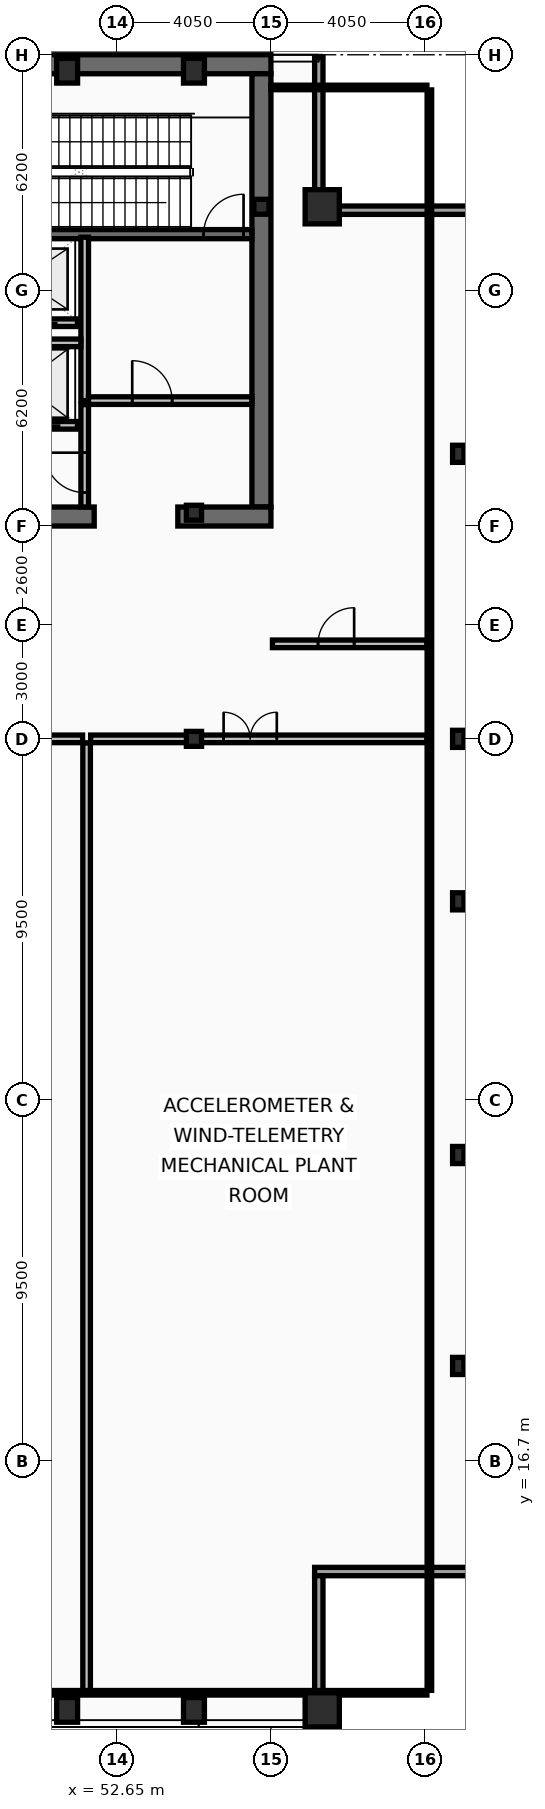
"""IFC4 building model, lengths in metres.
Left out: names, types, materials, properties, quantities, classifications, styles, units other than length and angle.
Written with IfcOpenShell. Run it as: python <this file> out.ifc"""

import sys

from ifc_helpers import new_model, si_unit, direction, frame, frame_2d, origin, origin_2d, place, context, subcontext, project, spatial, rectangle, hollow_rectangle, i_section, extrude, element, fill, save


model = new_model("IFC4")
c1 = context("Model", 3, precision=1e-05, world=origin(), true_north=direction((0.0, 1.0)))
c2 = subcontext(c1, "Body", "Model", "MODEL_VIEW")
j1 = project(units=[si_unit("LENGTHUNIT", "METRE"), si_unit("PLANEANGLEUNIT", "RADIAN")], contexts=[c1])
p1 = place(None, origin())
s1 = spatial("IfcSite", under=j1, at=p1, CompositionType="ELEMENT")
p2 = place(p1, origin())
s2 = spatial("IfcBuilding", under=s1, at=p2, CompositionType="ELEMENT")
p3 = place(p2, frame((0.0, 0.0, 350.6)))
s3 = spatial("IfcBuildingStorey", under=s2, at=p3, CompositionType="ELEMENT", Elevation=350.6)
p4 = place(p3, frame((16.2, 53.45, 0.0), z_axis=(0.0, 0.0, 1.0), x_axis=(1.0, 0.0, 0.0)))
e1 = element("IfcWall", 1, at=p4, inside=s3, PredefinedType="SHEAR", context=c2, shape_type="SweptSolid", body=[
    extrude(rectangle(XDim=40.5, YDim=0.5, at=frame_2d((20.25, 0.0))), origin(), (0.0, 0.0, 1.0), 5.4),
])
p5 = place(p3, frame((56.45, 53.2, 0.0), z_axis=(0.0, 0.0, 1.0), x_axis=(0.0, -1.0, 0.0)))
e2 = element("IfcWall", 2, at=p5, inside=s3, PredefinedType="SHEAR", context=c2, shape_type="SweptSolid", body=[
    extrude(rectangle(XDim=11.4, YDim=0.5, at=frame_2d((5.7, 0.0))), origin(), (0.0, 0.0, 1.0), 5.4),
])
p6 = place(p3, frame((52.05, 41.55, 0.0), z_axis=(0.0, 0.0, 1.0), x_axis=(-1.0, 0.0, 0.0)))
e3 = element("IfcWall", 3, at=p6, inside=s3, PredefinedType="SHEAR", context=c2, shape_type="SweptSolid", body=[
    extrude(rectangle(XDim=11.3, YDim=0.5, at=frame_2d((5.65, 0.0))), origin(), (0.0, 0.0, 1.0), 5.4),
])
p7 = place(p3, frame((56.7, 41.55, 0.0), z_axis=(0.0, 0.0, 1.0), x_axis=(-1.0, 0.0, 0.0)))
e4 = element("IfcWall", 4, at=p7, inside=s3, PredefinedType="SHEAR", context=c2, shape_type="SweptSolid", body=[
    extrude(rectangle(XDim=2.45, YDim=0.5, at=frame_2d((1.225, 0.0))), origin(), (0.0, 0.0, 1.0), 5.4),
])
p8 = place(p3, frame((48.63, 48.98, 0.0), z_axis=(0.0, 0.0, 1.0), x_axis=(1.0, 0.0, 0.0)))
e5 = element("IfcWall", 5, at=p8, inside=s3, PredefinedType="SHEAR", context=c2, shape_type="SweptSolid", body=[
    extrude(rectangle(XDim=7.57, YDim=0.24, at=frame_2d((3.785, 0.0))), origin(), (0.0, 0.0, 1.0), 5.4),
])
p9 = place(p8, frame((6.3, 0.0, 0.0)))
e6 = element("IfcOpeningElement", 6, at=p9, cuts=e5, PredefinedType="OPENING", context=c2, shape_type="SweptSolid", body=[
    extrude(rectangle(XDim=1.05, YDim=2.15, at=frame_2d((0.525, 1.075))), frame((0.0, 0.13, 0.0), z_axis=(0.0, -1.0, 0.0), x_axis=(1.0, 0.0, 0.0)), (0.0, 0.0, 1.0), 0.26),
])
for number, where, z_axis, x_axis in (
    (7, (58.05, 10.15, 0.0), (0.0, 0.0, 1.0), (1.0, 0.0, 0.0)),
    (8, (58.05, 49.7, 0.0), (0.0, 0.0, 1.0), (1.0, 0.0, 0.0)),
):
    element("IfcColumn", number, at=place(p3, frame(where, z_axis=z_axis, x_axis=x_axis)), inside=s3, PredefinedType="COLUMN", context=c2, shape_type="SweptSolid", body=[
        extrude(hollow_rectangle(XDim=0.9, YDim=0.9, WallThickness=0.05, at=origin_2d()), origin(), (0.0, 0.0, 1.0), 5.6),
    ])
for number, where, z_axis, x_axis in (
    (9, (51.337, 10.15, 0.0), (0.0, 0.0, 1.0), (1.0, 0.0, 0.0)),
    (10, (54.675, 10.15, 0.0), (0.0, 0.0, 1.0), (1.0, 0.0, 0.0)),
    (11, (51.337, 53.28, 0.0), (0.0, 0.0, 1.0), (1.0, 0.0, 0.0)),
    (12, (54.675, 53.28, 0.0), (0.0, 0.0, 1.0), (1.0, 0.0, 0.0)),
):
    element("IfcColumn", number, at=place(p3, frame(where, z_axis=z_axis, x_axis=x_axis)), inside=s3, PredefinedType="COLUMN", context=c2, shape_type="SweptSolid", body=[
        extrude(hollow_rectangle(XDim=0.55, YDim=0.65, WallThickness=0.04, at=origin_2d()), origin(), (0.0, 0.0, 1.0), 5.6),
    ])
for number, where, z_axis, x_axis in (
    (13, (61.63, 19.2, 0.0), (0.0, 0.0, 1.0), (1.0, 0.0, 0.0)),
    (14, (61.63, 24.75, 0.0), (0.0, 0.0, 1.0), (1.0, 0.0, 0.0)),
    (15, (61.63, 31.425, 0.0), (0.0, 0.0, 1.0), (1.0, 0.0, 0.0)),
    (16, (61.63, 35.7, 0.0), (0.0, 0.0, 1.0), (1.0, 0.0, 0.0)),
    (17, (61.63, 43.2, 0.0), (0.0, 0.0, 1.0), (1.0, 0.0, 0.0)),
):
    element("IfcColumn", number, at=place(p3, frame(where, z_axis=z_axis, x_axis=x_axis)), inside=s3, PredefinedType="COLUMN", context=c2, shape_type="SweptSolid", body=[
        extrude(i_section(OverallWidth=0.3, OverallDepth=0.45, WebThickness=0.014, FlangeThickness=0.026, at=origin_2d()), origin(), (0.0, 0.0, 1.0), 5.6),
    ])
for number, where, z_axis, x_axis in (
    (18, (56.45, 49.7, 0.0), (0.0, 0.0, 1.0), (1.0, 0.0, 0.0)),
    (19, (54.675, 35.7, 0.0), (0.0, 0.0, 1.0), (1.0, 0.0, 0.0)),
    (20, (54.675, 41.65, 0.0), (0.0, 0.0, 1.0), (1.0, 0.0, 0.0)),
):
    element("IfcColumn", number, at=place(p3, frame(where, z_axis=z_axis, x_axis=x_axis)), inside=s3, PredefinedType="COLUMN", context=c2, shape_type="SweptSolid", body=[
        extrude(i_section(OverallWidth=0.399, OverallDepth=0.393, WebThickness=0.023, FlangeThickness=0.037, at=origin_2d()), origin(), (0.0, 0.0, 1.0), 5.6),
    ])
p10 = place(p3, frame((57.96, 53.63, 0.0), z_axis=(0.0, 0.0, 1.0), x_axis=(0.0, -1.0, 0.0)))
e21 = element("IfcWall", 21, at=p10, inside=s3, PredefinedType="SOLIDWALL", context=c2, shape_type="SweptSolid", body=[
    extrude(rectangle(XDim=3.91, YDim=0.22, at=frame_2d((1.955, 0.0))), origin(), (0.0, 0.0, 1.0), 4.84),
])
for number, where, z_axis, x_axis in (
    (22, (57.85, 49.61, 0.0), (0.0, 0.0, 1.0), (1.0, 0.0, 0.0)),
    (23, (61.98, 13.79, 0.0), (0.0, 0.0, 1.0), (-1.0, 0.0, 0.0)),
):
    element("IfcWall", number, at=place(p3, frame(where, z_axis=z_axis, x_axis=x_axis)), inside=s3, PredefinedType="SOLIDWALL", context=c2, shape_type="SweptSolid", body=[
        extrude(rectangle(XDim=4.13, YDim=0.22, at=frame_2d((2.065, 0.0))), origin(), (0.0, 0.0, 1.0), 4.84),
    ])
p11 = place(p3, frame((57.96, 13.68, 0.0), z_axis=(0.0, 0.0, 1.0), x_axis=(0.0, -1.0, 0.0)))
e24 = element("IfcWall", 24, at=p11, inside=s3, PredefinedType="SOLIDWALL", context=c2, shape_type="SweptSolid", body=[
    extrude(rectangle(XDim=3.91, YDim=0.22, at=frame_2d((1.955, 0.0))), origin(), (0.0, 0.0, 1.0), 4.84),
])
p12 = place(p3, frame((51.61, 43.95, 0.0), z_axis=(0.0, 0.0, 1.0), x_axis=(-1.0, 0.0, 0.0)))
e25 = element("IfcWall", 25, at=p12, inside=s3, PredefinedType="PARTITIONING", context=c2, shape_type="SweptSolid", body=[
    extrude(rectangle(XDim=2.92, YDim=0.2, at=frame_2d((1.46, 0.0))), origin(), (0.0, 0.0, 1.0), 5.4),
])
p13 = place(p12, frame((0.81, 0.0, 0.0)))
e26 = element("IfcOpeningElement", 26, at=p13, cuts=e25, PredefinedType="OPENING", context=c2, shape_type="SweptSolid", body=[
    extrude(rectangle(XDim=1.3, YDim=2.18, at=frame_2d((0.65, 1.09))), frame((0.0, 0.11, 0.0), z_axis=(0.0, -1.0, 0.0), x_axis=(1.0, 0.0, 0.0)), (0.0, 0.0, 1.0), 0.22),
])
p14 = place(p3, frame((51.61, 46.65, 0.0), z_axis=(0.0, 0.0, 1.0), x_axis=(-1.0, 0.0, 0.0)))
e27 = element("IfcWall", 27, at=p14, inside=s3, PredefinedType="PARTITIONING", context=c2, shape_type="SweptSolid", body=[
    extrude(rectangle(XDim=2.92, YDim=0.2, at=frame_2d((1.46, 0.0))), origin(), (0.0, 0.0, 1.0), 5.4),
])
p15 = place(p14, frame((0.86, 0.0, 0.0)))
e28 = element("IfcOpeningElement", 28, at=p15, cuts=e27, PredefinedType="OPENING", context=c2, shape_type="SweptSolid", body=[
    extrude(rectangle(XDim=1.2, YDim=2.18, at=frame_2d((0.6, 1.09))), frame((0.0, 0.11, 0.0), z_axis=(0.0, -1.0, 0.0), x_axis=(1.0, 0.0, 0.0)), (0.0, 0.0, 1.0), 0.22),
])
p16 = place(p3, frame((51.8, 44.6, 0.0), z_axis=(0.0, 0.0, 1.0), x_axis=(0.0, 1.0, 0.0)))
e29 = element("IfcWall", 29, at=p16, inside=s3, PredefinedType="PARTITIONING", context=c2, shape_type="SweptSolid", body=[
    extrude(rectangle(XDim=4.3, YDim=0.2, at=frame_2d((2.15, 0.0))), origin(), (0.0, 0.0, 1.0), 5.4),
])
p17 = place(p3, frame((51.9, 44.6, 0.0), z_axis=(0.0, 0.0, 1.0), x_axis=(1.0, 0.0, 0.0)))
e30 = element("IfcWall", 30, at=p17, inside=s3, PredefinedType="PARTITIONING", context=c2, shape_type="SweptSolid", body=[
    extrude(rectangle(XDim=4.3, YDim=0.2, at=frame_2d((2.15, 0.0))), origin(), (0.0, 0.0, 1.0), 5.4),
])
p18 = place(p17, frame((1.15, 0.0, 0.0)))
e31 = element("IfcOpeningElement", 31, at=p18, cuts=e30, PredefinedType="OPENING", context=c2, shape_type="SweptSolid", body=[
    extrude(rectangle(XDim=1.05, YDim=2.15, at=frame_2d((0.525, 1.075))), frame((0.0, 0.11, 0.0), z_axis=(0.0, -1.0, 0.0), x_axis=(1.0, 0.0, 0.0)), (0.0, 0.0, 1.0), 0.22),
])
p19 = place(p3, frame((48.63, 46.12, 0.0), z_axis=(0.0, 0.0, 1.0), x_axis=(1.0, 0.0, 0.0)))
e32 = element("IfcWall", 32, at=p19, inside=s3, PredefinedType="PARTITIONING", context=c2, shape_type="SweptSolid", body=[
    extrude(rectangle(XDim=3.07, YDim=0.2, at=frame_2d((1.535, 0.0))), origin(), (0.0, 0.0, 1.0), 5.4),
])
p20 = place(p3, frame((51.8, 41.8, 0.0), z_axis=(0.0, 0.0, 1.0), x_axis=(0.0, 1.0, 0.0)))
e33 = element("IfcWall", 33, at=p20, inside=s3, PredefinedType="PARTITIONING", context=c2, shape_type="SweptSolid", body=[
    extrude(rectangle(XDim=2.695, YDim=0.2, at=frame_2d((1.348, 0.0))), origin(), (0.0, 0.0, 1.0), 5.4),
])
p21 = place(p20, frame((0.38, 0.0, 0.0)))
e34 = element("IfcOpeningElement", 34, at=p21, cuts=e33, PredefinedType="OPENING", context=c2, shape_type="SweptSolid", body=[
    extrude(rectangle(XDim=1.05, YDim=2.15, at=frame_2d((0.525, 1.075))), frame((0.0, 0.11, 0.0), z_axis=(0.0, -1.0, 0.0), x_axis=(1.0, 0.0, 0.0)), (0.0, 0.0, 1.0), 0.22),
])
p22 = place(p3, frame((47.555, 35.7, 0.0), z_axis=(0.0, 0.0, 1.0), x_axis=(1.0, 0.0, 0.0)))
e35 = element("IfcWall", 35, at=p22, inside=s3, PredefinedType="PARTITIONING", context=c2, shape_type="SweptSolid", body=[
    extrude(rectangle(XDim=4.19, YDim=0.2, at=frame_2d((2.095, 0.0))), origin(), (0.0, 0.0, 1.0), 4.79),
])
p23 = place(p3, frame((51.955, 35.7, 0.0), z_axis=(0.0, 0.0, 1.0), x_axis=(1.0, 0.0, 0.0)))
e36 = element("IfcWall", 36, at=p23, inside=s3, PredefinedType="PARTITIONING", context=c2, shape_type="SweptSolid", body=[
    extrude(rectangle(XDim=8.85, YDim=0.2, at=frame_2d((4.425, 0.0))), origin(), (0.0, 0.0, 1.0), 4.79),
])
p24 = place(p23, frame((3.5, 0.0, 0.0)))
e37 = element("IfcOpeningElement", 37, at=p24, cuts=e36, PredefinedType="OPENING", context=c2, shape_type="SweptSolid", body=[
    extrude(rectangle(XDim=1.4, YDim=2.15, at=frame_2d((0.7, 1.075))), frame((0.0, 0.11, 0.0), z_axis=(0.0, -1.0, 0.0), x_axis=(1.0, 0.0, 0.0)), (0.0, 0.0, 1.0), 0.22),
])
p25 = place(p3, frame((51.85, 10.565, 0.0), z_axis=(0.0, 0.0, 1.0), x_axis=(0.0, 1.0, 0.0)))
e38 = element("IfcWall", 38, at=p25, inside=s3, PredefinedType="PARTITIONING", context=c2, shape_type="SweptSolid", body=[
    extrude(rectangle(XDim=25.03, YDim=0.2, at=frame_2d((12.515, 0.0))), origin(), (0.0, 0.0, 1.0), 4.59),
])
p26 = place(p3, frame((56.74, 38.2, 0.0), z_axis=(0.0, 0.0, 1.0), x_axis=(1.0, 0.0, 0.0)))
e39 = element("IfcWall", 39, at=p26, inside=s3, PredefinedType="PARTITIONING", context=c2, shape_type="SweptSolid", body=[
    extrude(rectangle(XDim=4.065, YDim=0.2, at=frame_2d((2.032, 0.0))), origin(), (0.0, 0.0, 1.0), 5.4),
])
p27 = place(p26, frame((1.2, 0.0, 0.0)))
e40 = element("IfcOpeningElement", 40, at=p27, cuts=e39, PredefinedType="OPENING", context=c2, shape_type="SweptSolid", body=[
    extrude(rectangle(XDim=0.95, YDim=2.1, at=frame_2d((0.475, 1.05))), frame((0.0, 0.11, 0.0), z_axis=(0.0, -1.0, 0.0), x_axis=(1.0, 0.0, 0.0)), (0.0, 0.0, 1.0), 0.22),
])
p28 = place(p3, frame((60.87, 10.665, 0.0), z_axis=(0.0, 0.0, 1.0), x_axis=(0.0, 1.0, 0.0)))
e41 = element("IfcWall", 41, at=p28, inside=s3, PredefinedType="PARTITIONING", context=c2, shape_type="SweptSolid", body=[
    extrude(rectangle(XDim=42.11, YDim=0.12, at=frame_2d((21.055, 0.0))), origin(), (0.0, 0.0, 1.0), 4.79),
])
p29 = place(p3, frame((56.7, 52.84, 0.0), z_axis=(0.0, 0.0, 1.0), x_axis=(1.0, 0.0, 0.0)))
e42 = element("IfcWall", 42, at=p29, inside=s3, PredefinedType="PARTITIONING", context=c2, shape_type="SweptSolid", body=[
    extrude(rectangle(XDim=4.105, YDim=0.12, at=frame_2d((2.052, 0.0))), origin(), (0.0, 0.0, 1.0), 5.4),
])
p30 = place(p3, frame((12.095, 10.6, 0.0), z_axis=(0.0, 0.0, 1.0), x_axis=(1.0, 0.0, 0.0)))
e43 = element("IfcWall", 43, at=p30, inside=s3, PredefinedType="PARTITIONING", context=c2, shape_type="SweptSolid", body=[
    extrude(rectangle(XDim=48.71, YDim=0.12, at=frame_2d((24.355, 0.0))), origin(), (0.0, 0.0, 1.0), 4.79),
])
p31 = place(p9, origin())
e44 = element("IfcDoor", 44, at=p31, inside=s3, OperationType="SINGLE_SWING_RIGHT", PredefinedType="DOOR", context=c2, shape_type="SweptSolid", body=[
    extrude(rectangle(XDim=1.05, YDim=2.15, at=frame_2d((0.525, 1.075))), frame((0.0, 0.025, 0.0), z_axis=(0.0, -1.0, 0.0), x_axis=(1.0, 0.0, 0.0)), (0.0, 0.0, 1.0), 0.05),
])
fill(e6, e44)
p32 = place(p18, origin())
e45 = element("IfcDoor", 45, at=p32, inside=s3, OperationType="SINGLE_SWING_LEFT", PredefinedType="DOOR", context=c2, shape_type="SweptSolid", body=[
    extrude(rectangle(XDim=1.05, YDim=2.15, at=frame_2d((0.525, 1.075))), frame((0.0, 0.025, 0.0), z_axis=(0.0, -1.0, 0.0), x_axis=(1.0, 0.0, 0.0)), (0.0, 0.0, 1.0), 0.05),
])
fill(e31, e45)
p33 = place(p21, origin())
e46 = element("IfcDoor", 46, at=p33, inside=s3, OperationType="SINGLE_SWING_RIGHT", PredefinedType="DOOR", context=c2, shape_type="SweptSolid", body=[
    extrude(rectangle(XDim=1.05, YDim=2.15, at=frame_2d((0.525, 1.075))), frame((0.0, 0.025, 0.0), z_axis=(0.0, -1.0, 0.0), x_axis=(1.0, 0.0, 0.0)), (0.0, 0.0, 1.0), 0.05),
])
fill(e34, e46)
p34 = place(p24, origin())
e47 = element("IfcDoor", 47, at=p34, inside=s3, OperationType="DOUBLE_DOOR_SINGLE_SWING", PredefinedType="DOOR", context=c2, shape_type="SweptSolid", body=[
    extrude(rectangle(XDim=1.4, YDim=2.15, at=frame_2d((0.7, 1.075))), frame((0.0, 0.025, 0.0), z_axis=(0.0, -1.0, 0.0), x_axis=(1.0, 0.0, 0.0)), (0.0, 0.0, 1.0), 0.05),
])
fill(e37, e47)
p35 = place(p27, origin())
e48 = element("IfcDoor", 48, at=p35, inside=s3, OperationType="SINGLE_SWING_RIGHT", PredefinedType="DOOR", context=c2, shape_type="SweptSolid", body=[
    extrude(rectangle(XDim=0.95, YDim=2.1, at=frame_2d((0.475, 1.05))), frame((0.0, 0.025, 0.0), z_axis=(0.0, -1.0, 0.0), x_axis=(1.0, 0.0, 0.0)), (0.0, 0.0, 1.0), 0.05),
])
fill(e40, e48)
save(model, sys.argv[1])
